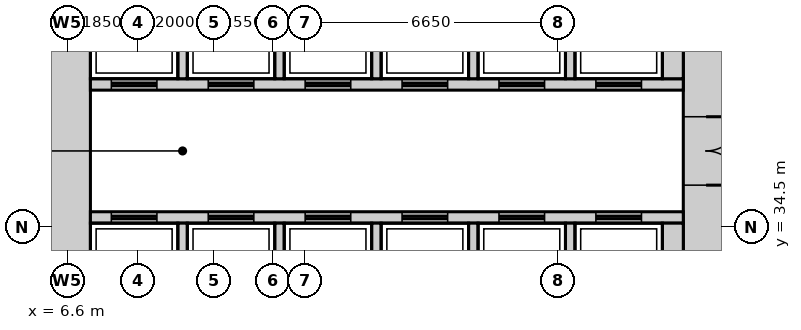
"""IFC4 building model, lengths in metres.
Left out: names, types, materials, properties, quantities, classifications, styles, units other than length and angle.
Written with IfcOpenShell. Run it as: python <this file> out.ifc"""

import sys

from ifc_helpers import new_model, si_unit, direction, frame, frame_2d, origin, place, context, subcontext, project, spatial, rectangle, extrude, source, transform, mapped, element, fill, save


model = new_model("IFC4")
c1 = context("Model", 3, precision=1e-05, world=origin(), true_north=direction((0.0, 1.0)))
c2 = subcontext(c1, "Body", "Model", "MODEL_VIEW")
j1 = project(units=[si_unit("LENGTHUNIT", "METRE"), si_unit("PLANEANGLEUNIT", "RADIAN")], contexts=[c1])
p1 = place(None, origin())
s1 = spatial("IfcSite", under=j1, at=p1, CompositionType="ELEMENT")
p2 = place(p1, origin())
s2 = spatial("IfcBuilding", under=s1, at=p2, CompositionType="ELEMENT")
p3 = place(p2, origin())
s3 = spatial("IfcBuildingStorey", under=s2, at=p3, CompositionType="ELEMENT", Elevation=0.0)
m1 = source(origin(), c2, "Body", "SweptSolid", [
    extrude(rectangle(XDim=27.6, YDim=1.2, at=frame_2d((13.8, 0.0))), origin(), (0.0, 0.0, 1.0), 7.2),
])
p4 = place(p3, frame((23.4, 13.2, 0.0), z_axis=(0.0, 0.0, 1.0), x_axis=(0.0, 1.0, 0.0)))
e1 = element("IfcWall", 1, at=p4, inside=s3, PredefinedType="SHEAR", context=c2, shape_type="MappedRepresentation", body=[
    mapped(m1, transform((0.0, 0.0, 0.0))),
])
m2 = source(origin(), c2, "Body", "SweptSolid", [
    extrude(rectangle(XDim=1.8, YDim=2.1, at=frame_2d((0.9, 1.05))), frame((0.0, 0.61, 0.0), z_axis=(0.0, -1.0, 0.0), x_axis=(1.0, 0.0, 0.0)), (0.0, 0.0, 1.0), 1.22),
])
p5 = place(p4, frame((22.4, 0.0, 0.0)))
e2 = element("IfcOpeningElement", 2, at=p5, cuts=e1, PredefinedType="OPENING", context=c2, shape_type="MappedRepresentation", body=[
    mapped(m2, transform((0.0, 0.0, 0.0))),
])
m3 = source(origin(), c2, "Body", "SweptSolid", [
    extrude(rectangle(XDim=1.2, YDim=2.1, at=frame_2d((0.6, 1.05))), frame((0.0, 0.61, 0.0), z_axis=(0.0, -1.0, 0.0), x_axis=(1.0, 0.0, 0.0)), (0.0, 0.0, 1.0), 1.22),
])
p6 = place(p4, frame((13.65, 0.0, 0.0)))
e3 = element("IfcOpeningElement", 3, at=p6, cuts=e1, PredefinedType="OPENING", context=c2, shape_type="MappedRepresentation", body=[
    mapped(m3, transform((0.0, 0.0, 0.0))),
])
m4 = source(origin(), c2, "Body", "SweptSolid", [
    extrude(rectangle(XDim=0.9, YDim=2.1, at=frame_2d((0.45, 1.05))), frame((0.0, 0.61, 0.0), z_axis=(0.0, -1.0, 0.0), x_axis=(1.0, 0.0, 0.0)), (0.0, 0.0, 1.0), 1.22),
])
p7 = place(p4, frame((1.95, 0.0, 0.0)))
e4 = element("IfcOpeningElement", 4, at=p7, cuts=e1, PredefinedType="OPENING", context=c2, shape_type="MappedRepresentation", body=[
    mapped(m4, transform((0.0, 0.0, 0.0))),
])
p8 = place(p4, frame((6.8, 0.0, 0.0)))
e5 = element("IfcOpeningElement", 5, at=p8, cuts=e1, PredefinedType="OPENING", context=c2, shape_type="MappedRepresentation", body=[
    mapped(m4, transform((0.0, 0.0, 0.0))),
])
p9 = place(p3, frame((6.6, 13.2, 0.0), z_axis=(0.0, 0.0, 1.0), x_axis=(0.0, 1.0, 0.0)))
e6 = element("IfcWall", 6, at=p9, inside=s3, PredefinedType="SHEAR", context=c2, shape_type="MappedRepresentation", body=[
    mapped(m1, transform((0.0, 0.0, 0.0))),
])
m5 = source(origin(), c2, "Body", "SweptSolid", [
    extrude(rectangle(XDim=15.6, YDim=0.3, at=frame_2d((7.8, 0.0))), origin(), (0.0, 0.0, 1.0), 7.2),
])
p10 = place(p3, frame((7.2, 38.25, 0.0), z_axis=(0.0, 0.0, 1.0), x_axis=(1.0, 0.0, 0.0)))
e7 = element("IfcWall", 7, at=p10, inside=s3, PredefinedType="STANDARD", context=c2, shape_type="MappedRepresentation", body=[
    mapped(m5, transform((0.0, 0.0, 0.0))),
])
m6 = source(origin(), c2, "Body", "SweptSolid", [
    extrude(rectangle(XDim=1.2, YDim=2.1, at=frame_2d((0.6, 1.05))), frame((0.0, 0.16, 0.0), z_axis=(0.0, -1.0, 0.0), x_axis=(1.0, 0.0, 0.0)), (0.0, 0.0, 1.0), 0.32),
])
p11 = place(p10, frame((0.55, 0.0, 0.0)))
e8 = element("IfcOpeningElement", 8, at=p11, cuts=e7, PredefinedType="OPENING", context=c2, shape_type="MappedRepresentation", body=[
    mapped(m6, transform((0.0, 0.0, 0.0))),
])
p12 = place(p10, frame((3.1, 0.0, 0.0)))
e9 = element("IfcOpeningElement", 9, at=p12, cuts=e7, PredefinedType="OPENING", context=c2, shape_type="MappedRepresentation", body=[
    mapped(m6, transform((0.0, 0.0, 0.0))),
])
p13 = place(p10, frame((5.65, 0.0, 0.0)))
e10 = element("IfcOpeningElement", 10, at=p13, cuts=e7, PredefinedType="OPENING", context=c2, shape_type="MappedRepresentation", body=[
    mapped(m6, transform((0.0, 0.0, 0.0))),
])
p14 = place(p10, frame((8.2, 0.0, 0.0)))
e11 = element("IfcOpeningElement", 11, at=p14, cuts=e7, PredefinedType="OPENING", context=c2, shape_type="MappedRepresentation", body=[
    mapped(m6, transform((0.0, 0.0, 0.0))),
])
p15 = place(p10, frame((10.75, 0.0, 0.0)))
e12 = element("IfcOpeningElement", 12, at=p15, cuts=e7, PredefinedType="OPENING", context=c2, shape_type="MappedRepresentation", body=[
    mapped(m6, transform((0.0, 0.0, 0.0))),
])
p16 = place(p10, frame((13.3, 0.0, 0.0)))
e13 = element("IfcOpeningElement", 13, at=p16, cuts=e7, PredefinedType="OPENING", context=c2, shape_type="MappedRepresentation", body=[
    mapped(m6, transform((0.0, 0.0, 0.0))),
])
p17 = place(p3, frame((7.2, 34.75, 0.0), z_axis=(0.0, 0.0, 1.0), x_axis=(1.0, 0.0, 0.0)))
e14 = element("IfcWall", 14, at=p17, inside=s3, PredefinedType="STANDARD", context=c2, shape_type="MappedRepresentation", body=[
    mapped(m5, transform((0.0, 0.0, 0.0))),
])
p18 = place(p17, frame((0.55, 0.0, 0.0)))
e15 = element("IfcOpeningElement", 15, at=p18, cuts=e14, PredefinedType="OPENING", context=c2, shape_type="MappedRepresentation", body=[
    mapped(m6, transform((0.0, 0.0, 0.0))),
])
p19 = place(p17, frame((3.1, 0.0, 0.0)))
e16 = element("IfcOpeningElement", 16, at=p19, cuts=e14, PredefinedType="OPENING", context=c2, shape_type="MappedRepresentation", body=[
    mapped(m6, transform((0.0, 0.0, 0.0))),
])
p20 = place(p17, frame((5.65, 0.0, 0.0)))
e17 = element("IfcOpeningElement", 17, at=p20, cuts=e14, PredefinedType="OPENING", context=c2, shape_type="MappedRepresentation", body=[
    mapped(m6, transform((0.0, 0.0, 0.0))),
])
p21 = place(p17, frame((8.2, 0.0, 0.0)))
e18 = element("IfcOpeningElement", 18, at=p21, cuts=e14, PredefinedType="OPENING", context=c2, shape_type="MappedRepresentation", body=[
    mapped(m6, transform((0.0, 0.0, 0.0))),
])
p22 = place(p17, frame((10.75, 0.0, 0.0)))
e19 = element("IfcOpeningElement", 19, at=p22, cuts=e14, PredefinedType="OPENING", context=c2, shape_type="MappedRepresentation", body=[
    mapped(m6, transform((0.0, 0.0, 0.0))),
])
p23 = place(p17, frame((13.3, 0.0, 0.0)))
e20 = element("IfcOpeningElement", 20, at=p23, cuts=e14, PredefinedType="OPENING", context=c2, shape_type="MappedRepresentation", body=[
    mapped(m6, transform((0.0, 0.0, 0.0))),
])
m7 = source(origin(), c2, "Body", "SweptSolid", [
    extrude(rectangle(XDim=2.4, YDim=0.25, at=frame_2d((1.2, 0.0))), origin(), (0.0, 0.0, 1.0), 7.2),
])
for number, where, z_axis, x_axis in (
    (21, (9.625, 38.4, 0.0), (0.0, 0.0, 1.0), (0.0, 1.0, 0.0)),
    (22, (12.175, 38.4, 0.0), (0.0, 0.0, 1.0), (0.0, 1.0, 0.0)),
    (23, (14.725, 38.4, 0.0), (0.0, 0.0, 1.0), (0.0, 1.0, 0.0)),
    (24, (17.275, 38.4, 0.0), (0.0, 0.0, 1.0), (0.0, 1.0, 0.0)),
    (25, (19.825, 38.4, 0.0), (0.0, 0.0, 1.0), (0.0, 1.0, 0.0)),
):
    element("IfcWall", number, at=place(p3, frame(where, z_axis=z_axis, x_axis=x_axis)), inside=s3, PredefinedType="STANDARD", context=c2, shape_type="MappedRepresentation", body=[
        mapped(m7, transform((0.0, 0.0, 0.0))),
    ])
m8 = source(origin(), c2, "Body", "SweptSolid", [
    extrude(rectangle(XDim=2.4, YDim=0.55, at=frame_2d((1.2, 0.0))), origin(), (0.0, 0.0, 1.0), 7.2),
])
p24 = place(p3, frame((22.525, 38.4, 0.0), z_axis=(0.0, 0.0, 1.0), x_axis=(0.0, 1.0, 0.0)))
e26 = element("IfcWall", 26, at=p24, inside=s3, PredefinedType="STANDARD", context=c2, shape_type="MappedRepresentation", body=[
    mapped(m8, transform((0.0, 0.0, 0.0))),
])
for number, where, z_axis, x_axis in (
    (27, (9.625, 32.2, 0.0), (0.0, 0.0, 1.0), (0.0, 1.0, 0.0)),
    (28, (12.175, 32.2, 0.0), (0.0, 0.0, 1.0), (0.0, 1.0, 0.0)),
    (29, (14.725, 32.2, 0.0), (0.0, 0.0, 1.0), (0.0, 1.0, 0.0)),
    (30, (17.275, 32.2, 0.0), (0.0, 0.0, 1.0), (0.0, 1.0, 0.0)),
    (31, (19.825, 32.2, 0.0), (0.0, 0.0, 1.0), (0.0, 1.0, 0.0)),
):
    element("IfcWall", number, at=place(p3, frame(where, z_axis=z_axis, x_axis=x_axis)), inside=s3, PredefinedType="STANDARD", context=c2, shape_type="MappedRepresentation", body=[
        mapped(m7, transform((0.0, 0.0, 0.0))),
    ])
p25 = place(p3, frame((22.525, 32.2, 0.0), z_axis=(0.0, 0.0, 1.0), x_axis=(0.0, 1.0, 0.0)))
e32 = element("IfcWall", 32, at=p25, inside=s3, PredefinedType="STANDARD", context=c2, shape_type="MappedRepresentation", body=[
    mapped(m8, transform((0.0, 0.0, 0.0))),
])
m9 = source(origin(), c2, "Body", "SweptSolid", [
    extrude(rectangle(XDim=1.8, YDim=2.1, at=frame_2d((0.9, 1.05))), frame((0.0, 0.55, 0.0), z_axis=(0.0, -1.0, 0.0), x_axis=(1.0, 0.0, 0.0)), (0.0, 0.0, 1.0), 1.1),
])
p26 = place(p5, origin())
e33 = element("IfcDoor", 33, at=p26, inside=s3, OperationType="DOUBLE_DOOR_SINGLE_SWING", PredefinedType="DOOR", context=c2, shape_type="MappedRepresentation", body=[
    mapped(m9, transform((0.0, 0.0, 0.0))),
])
fill(e2, e33)
m10 = source(origin(), c2, "Body", "SweptSolid", [
    extrude(rectangle(XDim=1.2, YDim=2.1, at=frame_2d((0.6, 1.05))), frame((0.0, 0.025, 0.0), z_axis=(0.0, -1.0, 0.0), x_axis=(1.0, 0.0, 0.0)), (0.0, 0.0, 1.0), 0.05),
])
p27 = place(p18, origin())
e34 = element("IfcDoor", 34, at=p27, inside=s3, OperationType="DOUBLE_DOOR_SLIDING", PredefinedType="DOOR", context=c2, shape_type="MappedRepresentation", body=[
    mapped(m10, transform((0.0, 0.0, 0.0))),
])
fill(e15, e34)
p28 = place(p19, origin())
e35 = element("IfcDoor", 35, at=p28, inside=s3, OperationType="DOUBLE_DOOR_SLIDING", PredefinedType="DOOR", context=c2, shape_type="MappedRepresentation", body=[
    mapped(m10, transform((0.0, 0.0, 0.0))),
])
fill(e16, e35)
p29 = place(p20, origin())
e36 = element("IfcDoor", 36, at=p29, inside=s3, OperationType="DOUBLE_DOOR_SLIDING", PredefinedType="DOOR", context=c2, shape_type="MappedRepresentation", body=[
    mapped(m10, transform((0.0, 0.0, 0.0))),
])
fill(e17, e36)
p30 = place(p21, origin())
e37 = element("IfcDoor", 37, at=p30, inside=s3, OperationType="DOUBLE_DOOR_SLIDING", PredefinedType="DOOR", context=c2, shape_type="MappedRepresentation", body=[
    mapped(m10, transform((0.0, 0.0, 0.0))),
])
fill(e18, e37)
p31 = place(p22, origin())
e38 = element("IfcDoor", 38, at=p31, inside=s3, OperationType="DOUBLE_DOOR_SLIDING", PredefinedType="DOOR", context=c2, shape_type="MappedRepresentation", body=[
    mapped(m10, transform((0.0, 0.0, 0.0))),
])
fill(e19, e38)
p32 = place(p23, origin())
e39 = element("IfcDoor", 39, at=p32, inside=s3, OperationType="DOUBLE_DOOR_SLIDING", PredefinedType="DOOR", context=c2, shape_type="MappedRepresentation", body=[
    mapped(m10, transform((0.0, 0.0, 0.0))),
])
fill(e20, e39)
p33 = place(p11, origin())
e40 = element("IfcDoor", 40, at=p33, inside=s3, OperationType="DOUBLE_DOOR_SLIDING", PredefinedType="DOOR", context=c2, shape_type="MappedRepresentation", body=[
    mapped(m10, transform((0.0, 0.0, 0.0))),
])
fill(e8, e40)
p34 = place(p12, origin())
e41 = element("IfcDoor", 41, at=p34, inside=s3, OperationType="DOUBLE_DOOR_SLIDING", PredefinedType="DOOR", context=c2, shape_type="MappedRepresentation", body=[
    mapped(m10, transform((0.0, 0.0, 0.0))),
])
fill(e9, e41)
p35 = place(p13, origin())
e42 = element("IfcDoor", 42, at=p35, inside=s3, OperationType="DOUBLE_DOOR_SLIDING", PredefinedType="DOOR", context=c2, shape_type="MappedRepresentation", body=[
    mapped(m10, transform((0.0, 0.0, 0.0))),
])
fill(e10, e42)
p36 = place(p14, origin())
e43 = element("IfcDoor", 43, at=p36, inside=s3, OperationType="DOUBLE_DOOR_SLIDING", PredefinedType="DOOR", context=c2, shape_type="MappedRepresentation", body=[
    mapped(m10, transform((0.0, 0.0, 0.0))),
])
fill(e11, e43)
p37 = place(p15, origin())
e44 = element("IfcDoor", 44, at=p37, inside=s3, OperationType="DOUBLE_DOOR_SLIDING", PredefinedType="DOOR", context=c2, shape_type="MappedRepresentation", body=[
    mapped(m10, transform((0.0, 0.0, 0.0))),
])
fill(e12, e44)
p38 = place(p16, origin())
e45 = element("IfcDoor", 45, at=p38, inside=s3, OperationType="DOUBLE_DOOR_SLIDING", PredefinedType="DOOR", context=c2, shape_type="MappedRepresentation", body=[
    mapped(m10, transform((0.0, 0.0, 0.0))),
])
fill(e13, e45)
save(model, sys.argv[1])
